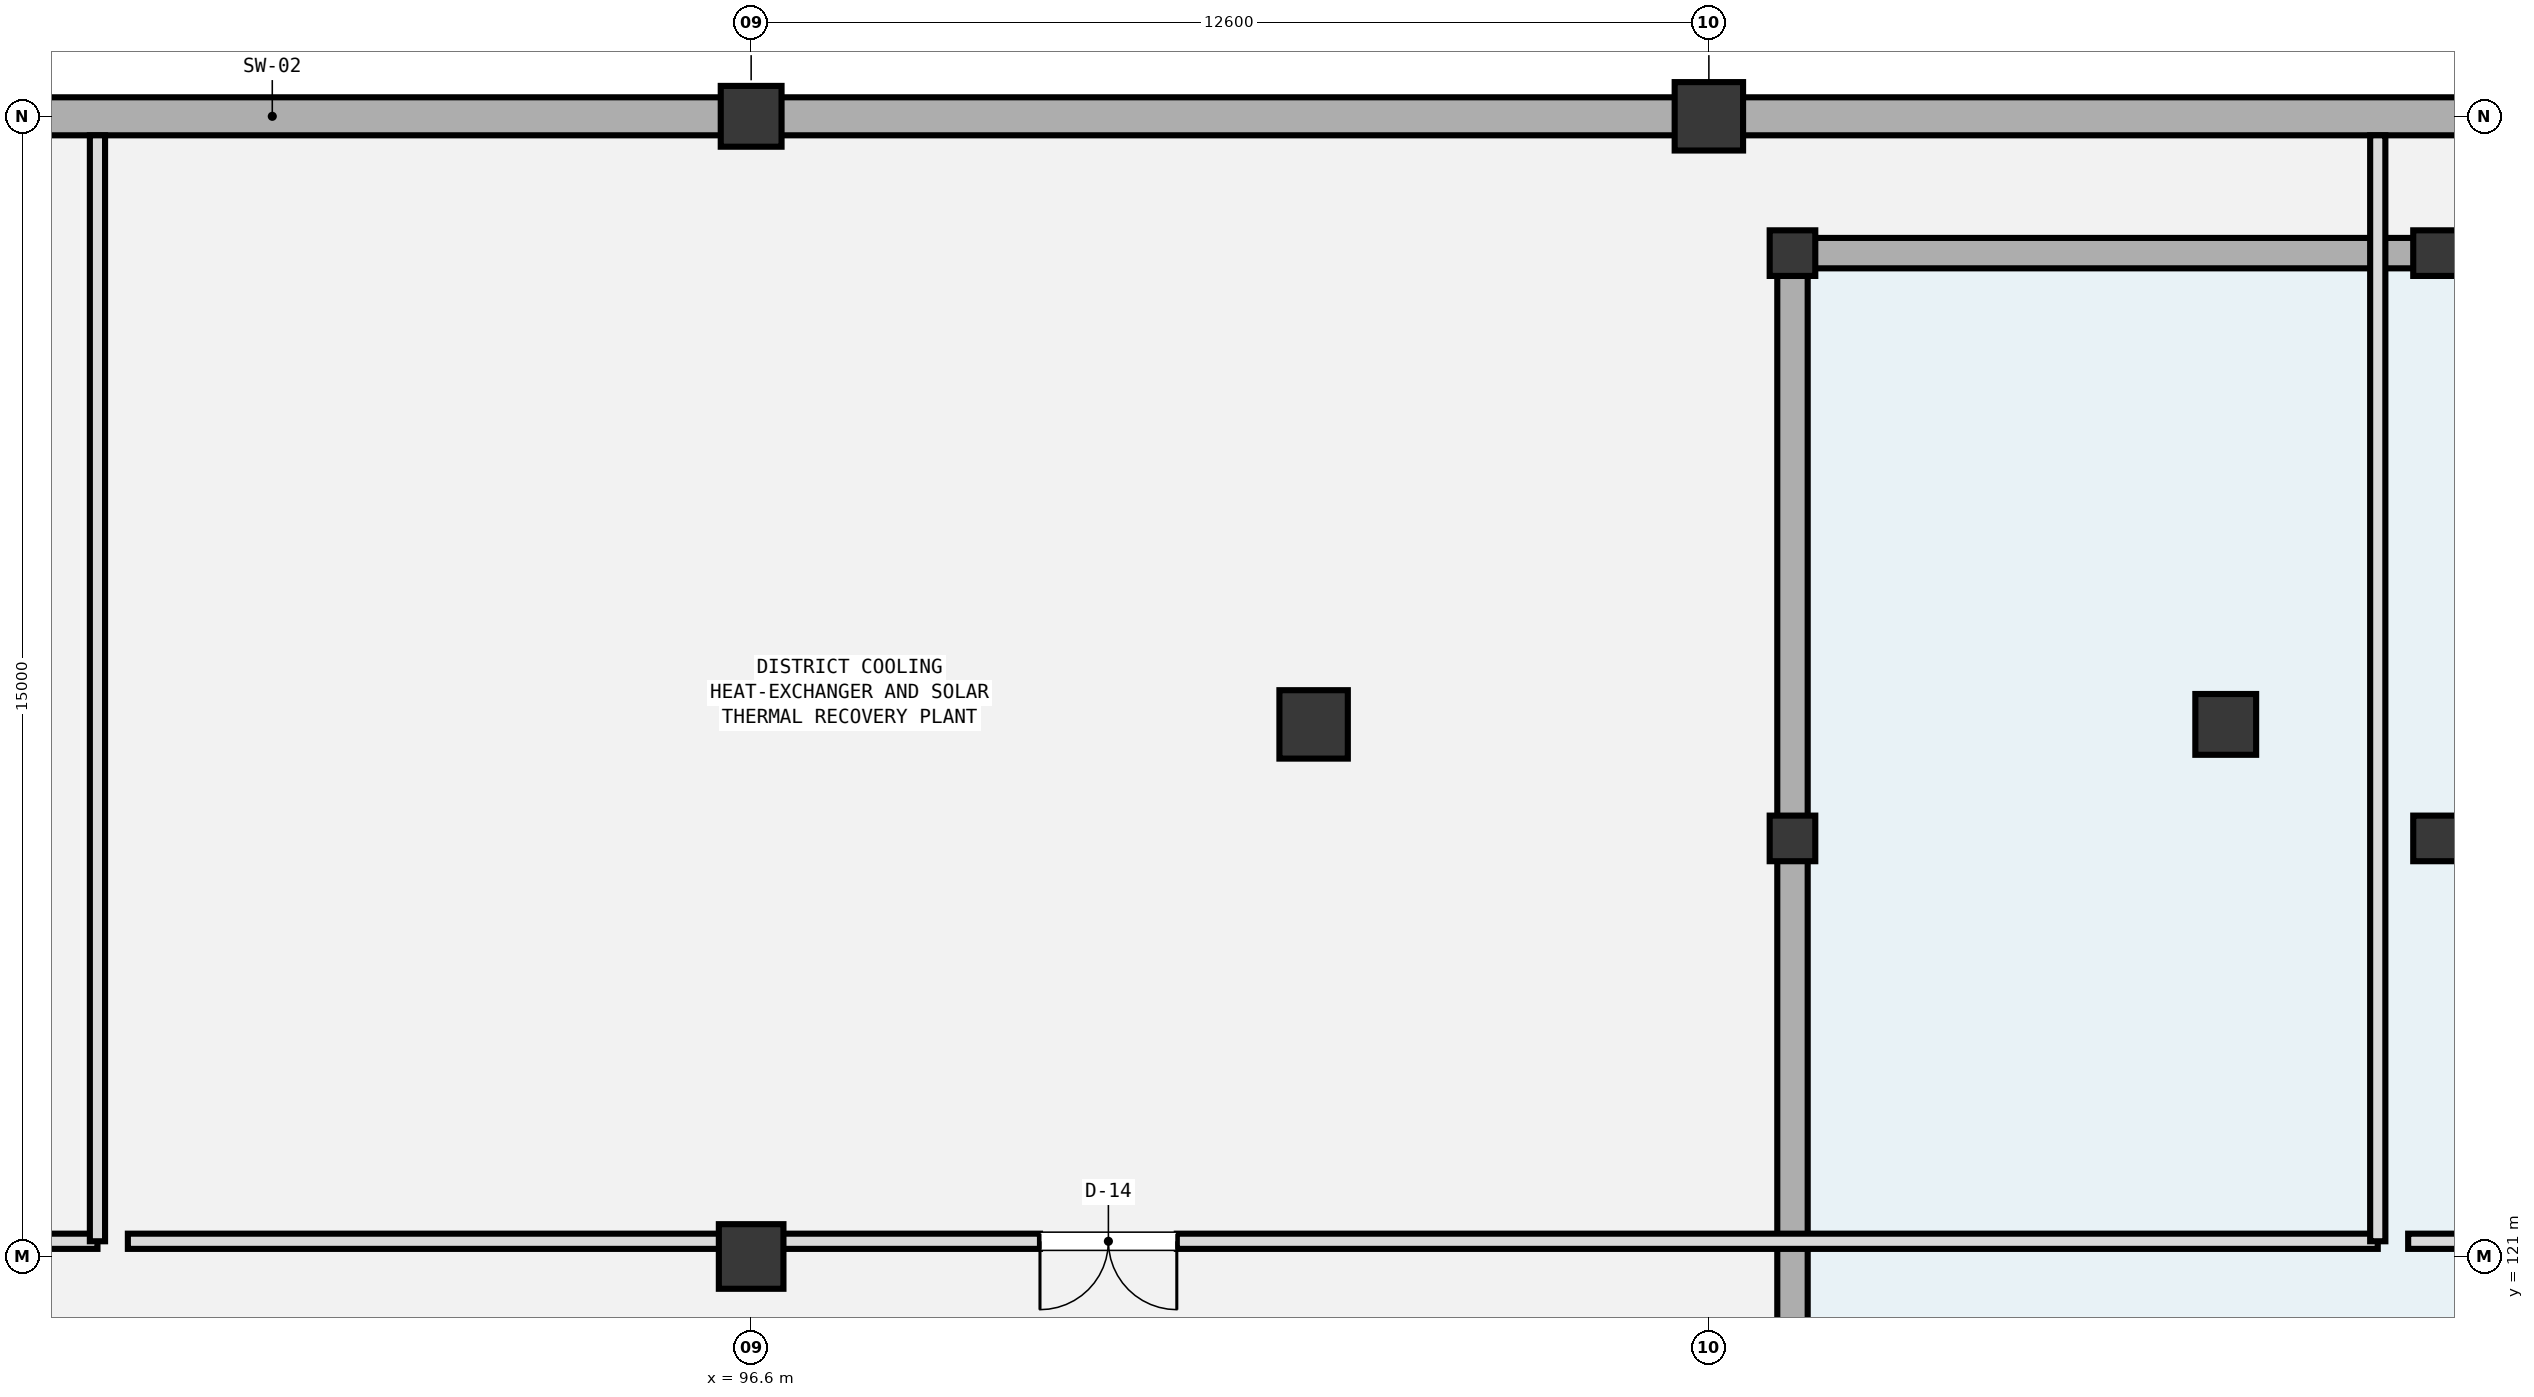
"""IFC4 building model, lengths in metres.
Left out: names, types, materials, properties, quantities, classifications, styles, units other than length and angle.
Written with IfcOpenShell. Run it as: python <this file> out.ifc"""

import sys

from ifc_helpers import new_model, si_unit, direction, frame, frame_2d, origin, origin_2d, place, context, subcontext, project, spatial, rectangle, extrude, element, fill, save


model = new_model("IFC4")
c1 = context("Model", 3, precision=1e-05, world=origin(), true_north=direction((0.0, 1.0)))
c2 = subcontext(c1, "Body", "Model", "MODEL_VIEW")
j1 = project(units=[si_unit("LENGTHUNIT", "METRE"), si_unit("PLANEANGLEUNIT", "RADIAN")], contexts=[c1])
p1 = place(None, origin())
s1 = spatial("IfcSite", under=j1, at=p1, CompositionType="ELEMENT")
p2 = place(p1, origin())
s2 = spatial("IfcBuilding", under=s1, at=p2, CompositionType="ELEMENT")
p3 = place(p2, frame((0.0, 0.0, -5.4)))
s3 = spatial("IfcBuildingStorey", under=s2, at=p3, CompositionType="ELEMENT", Elevation=-5.4)
for number, where, z_axis, x_axis in (
    (1, (110.3, 126.5, -0.55), (0.0, 0.0, 1.0), (1.0, 0.0, 0.0)),
    (2, (110.3, 134.2, -0.55), (0.0, 0.0, 1.0), (1.0, 0.0, 0.0)),
    (3, (118.767, 126.5, -0.55), (0.0, 0.0, 1.0), (1.0, 0.0, 0.0)),
    (4, (118.767, 134.2, -0.55), (0.0, 0.0, 1.0), (1.0, 0.0, 0.0)),
):
    element("IfcColumn", number, at=place(p3, frame(where, z_axis=z_axis, x_axis=x_axis)), inside=s3, PredefinedType="COLUMN", context=c2, shape_type="SweptSolid", body=[
        extrude(rectangle(XDim=0.6, YDim=0.6, at=origin_2d()), origin(), (0.0, 0.0, 1.0), 3.7),
    ])
p4 = place(p3, frame((110.1, 134.2, 3.6), z_axis=(0.0, 0.0, 1.0), x_axis=(1.0, 0.0, 0.0)))
e5 = element("IfcWall", 5, at=p4, inside=s3, PredefinedType="SOLIDWALL", context=c2, shape_type="SweptSolid", body=[
    extrude(rectangle(XDim=25.8, YDim=0.4, at=frame_2d((12.9, 0.0))), origin(), (0.0, 0.0, 1.0), 1.46),
])
p5 = place(p3, frame((110.3, 119.0, 3.6), z_axis=(0.0, 0.0, 1.0), x_axis=(0.0, 1.0, 0.0)))
e6 = element("IfcWall", 6, at=p5, inside=s3, PredefinedType="SOLIDWALL", context=c2, shape_type="SweptSolid", body=[
    extrude(rectangle(XDim=15.0, YDim=0.4, at=frame_2d((7.5, 0.0))), origin(), (0.0, 0.0, 1.0), 1.46),
])
p6 = place(p3, frame((156.0, 136.0, 0.0), z_axis=(0.0, 0.0, 1.0), x_axis=(-1.0, 0.0, 0.0)))
e7 = element("IfcWall", 7, at=p6, inside=s3, PredefinedType="USERDEFINED", context=c2, shape_type="SweptSolid", body=[
    extrude(rectangle(XDim=131.4, YDim=0.5, at=frame_2d((65.7, 0.0))), origin(), (0.0, 0.0, 1.0), 4.98),
])
p7 = place(p3, frame((96.6, 121.0, -0.55), z_axis=(0.0, 0.0, 1.0), x_axis=(1.0, 0.0, 0.0)))
e8 = element("IfcColumn", 8, at=p7, inside=s3, PredefinedType="COLUMN", context=c2, shape_type="SweptSolid", body=[
    extrude(rectangle(XDim=0.85, YDim=0.85, at=origin_2d()), origin(), (0.0, 0.0, 1.0), 5.95),
])
p8 = place(p3, frame((96.6, 136.0, -0.55), z_axis=(0.0, 0.0, 1.0), x_axis=(1.0, 0.0, 0.0)))
e9 = element("IfcColumn", 9, at=p8, inside=s3, PredefinedType="COLUMN", context=c2, shape_type="SweptSolid", body=[
    extrude(rectangle(XDim=0.8, YDim=0.8, at=origin_2d()), origin(), (0.0, 0.0, 1.0), 5.95),
])
for number, where, z_axis, x_axis in (
    (10, (104.0, 128.0, -0.55), (0.0, 0.0, 1.0), (1.0, 0.0, 0.0)),
    (11, (109.2, 136.0, -0.55), (0.0, 0.0, 1.0), (1.0, 0.0, 0.0)),
):
    element("IfcColumn", number, at=place(p3, frame(where, z_axis=z_axis, x_axis=x_axis)), inside=s3, PredefinedType="COLUMN", context=c2, shape_type="SweptSolid", body=[
        extrude(rectangle(XDim=0.9, YDim=0.9, at=origin_2d()), origin(), (0.0, 0.0, 1.0), 5.95),
    ])
p9 = place(p3, frame((116.0, 128.0, -0.55), z_axis=(0.0, 0.0, 1.0), x_axis=(1.0, 0.0, 0.0)))
e12 = element("IfcColumn", 12, at=p9, inside=s3, PredefinedType="COLUMN", context=c2, shape_type="SweptSolid", body=[
    extrude(rectangle(XDim=0.8, YDim=0.8, at=origin_2d()), origin(), (0.0, 0.0, 1.0), 5.95),
])
p10 = place(p3, frame((68.4, 121.2, 0.0), z_axis=(0.0, 0.0, 1.0), x_axis=(1.0, 0.0, 0.0)))
e13 = element("IfcWall", 13, at=p10, inside=s3, PredefinedType="SOLIDWALL", context=c2, shape_type="SweptSolid", body=[
    extrude(rectangle(XDim=19.6, YDim=0.2, at=frame_2d((9.8, 0.0))), origin(), (0.0, 0.0, 1.0), 3.8),
])
p11 = place(p10, frame((8.0, 0.0, 0.0)))
e14 = element("IfcOpeningElement", 14, at=p11, cuts=e13, PredefinedType="OPENING", context=c2, shape_type="SweptSolid", body=[
    extrude(rectangle(XDim=1.8, YDim=2.4, at=frame_2d((0.9, 1.2))), frame((0.0, 0.11, 0.0), z_axis=(0.0, -1.0, 0.0), x_axis=(1.0, 0.0, 0.0)), (0.0, 0.0, 1.0), 0.22),
])
p12 = place(p3, frame((88.0, 121.2, 0.0), z_axis=(0.0, 0.0, 1.0), x_axis=(0.0, 1.0, 0.0)))
e15 = element("IfcWall", 15, at=p12, inside=s3, PredefinedType="SOLIDWALL", context=c2, shape_type="SweptSolid", body=[
    extrude(rectangle(XDim=14.55, YDim=0.2, at=frame_2d((7.275, 0.0))), origin(), (0.0, 0.0, 1.0), 3.8),
])
p13 = place(p3, frame((88.4, 121.2, 0.0), z_axis=(0.0, 0.0, 1.0), x_axis=(1.0, 0.0, 0.0)))
e16 = element("IfcWall", 16, at=p13, inside=s3, PredefinedType="SOLIDWALL", context=c2, shape_type="SweptSolid", body=[
    extrude(rectangle(XDim=29.6, YDim=0.2, at=frame_2d((14.8, 0.0))), origin(), (0.0, 0.0, 1.0), 3.8),
])
p14 = place(p13, frame((12.0, 0.0, 0.0)))
e17 = element("IfcOpeningElement", 17, at=p14, cuts=e16, PredefinedType="OPENING", context=c2, shape_type="SweptSolid", body=[
    extrude(rectangle(XDim=1.8, YDim=2.4, at=frame_2d((0.9, 1.2))), frame((0.0, 0.11, 0.0), z_axis=(0.0, -1.0, 0.0), x_axis=(1.0, 0.0, 0.0)), (0.0, 0.0, 1.0), 0.22),
])
p15 = place(p3, frame((118.0, 121.2, 0.0), z_axis=(0.0, 0.0, 1.0), x_axis=(0.0, 1.0, 0.0)))
e18 = element("IfcWall", 18, at=p15, inside=s3, PredefinedType="SOLIDWALL", context=c2, shape_type="SweptSolid", body=[
    extrude(rectangle(XDim=14.55, YDim=0.2, at=frame_2d((7.275, 0.0))), origin(), (0.0, 0.0, 1.0), 3.8),
])
p16 = place(p3, frame((118.4, 121.2, 0.0), z_axis=(0.0, 0.0, 1.0), x_axis=(1.0, 0.0, 0.0)))
e19 = element("IfcWall", 19, at=p16, inside=s3, PredefinedType="SOLIDWALL", context=c2, shape_type="SweptSolid", body=[
    extrude(rectangle(XDim=37.35, YDim=0.2, at=frame_2d((18.675, 0.0))), origin(), (0.0, 0.0, 1.0), 3.8),
])
p17 = place(p16, frame((14.0, 0.0, 0.0)))
e20 = element("IfcOpeningElement", 20, at=p17, cuts=e19, PredefinedType="OPENING", context=c2, shape_type="SweptSolid", body=[
    extrude(rectangle(XDim=1.8, YDim=2.4, at=frame_2d((0.9, 1.2))), frame((0.0, 0.11, 0.0), z_axis=(0.0, -1.0, 0.0), x_axis=(1.0, 0.0, 0.0)), (0.0, 0.0, 1.0), 0.22),
])
p18 = place(p14, frame((1.8, 0.0, 0.0), z_axis=(0.0, 0.0, 1.0), x_axis=(-1.0, 0.0, 0.0)))
e21 = element("IfcDoor", 21, at=p18, inside=s3, OperationType="DOUBLE_DOOR_SINGLE_SWING", PredefinedType="DOOR", context=c2, shape_type="SweptSolid", body=[
    extrude(rectangle(XDim=1.8, YDim=2.4, at=frame_2d((0.9, 1.2))), frame((0.0, 0.025, 0.0), z_axis=(0.0, -1.0, 0.0), x_axis=(1.0, 0.0, 0.0)), (0.0, 0.0, 1.0), 0.05),
])
fill(e17, e21)
save(model, sys.argv[1])
